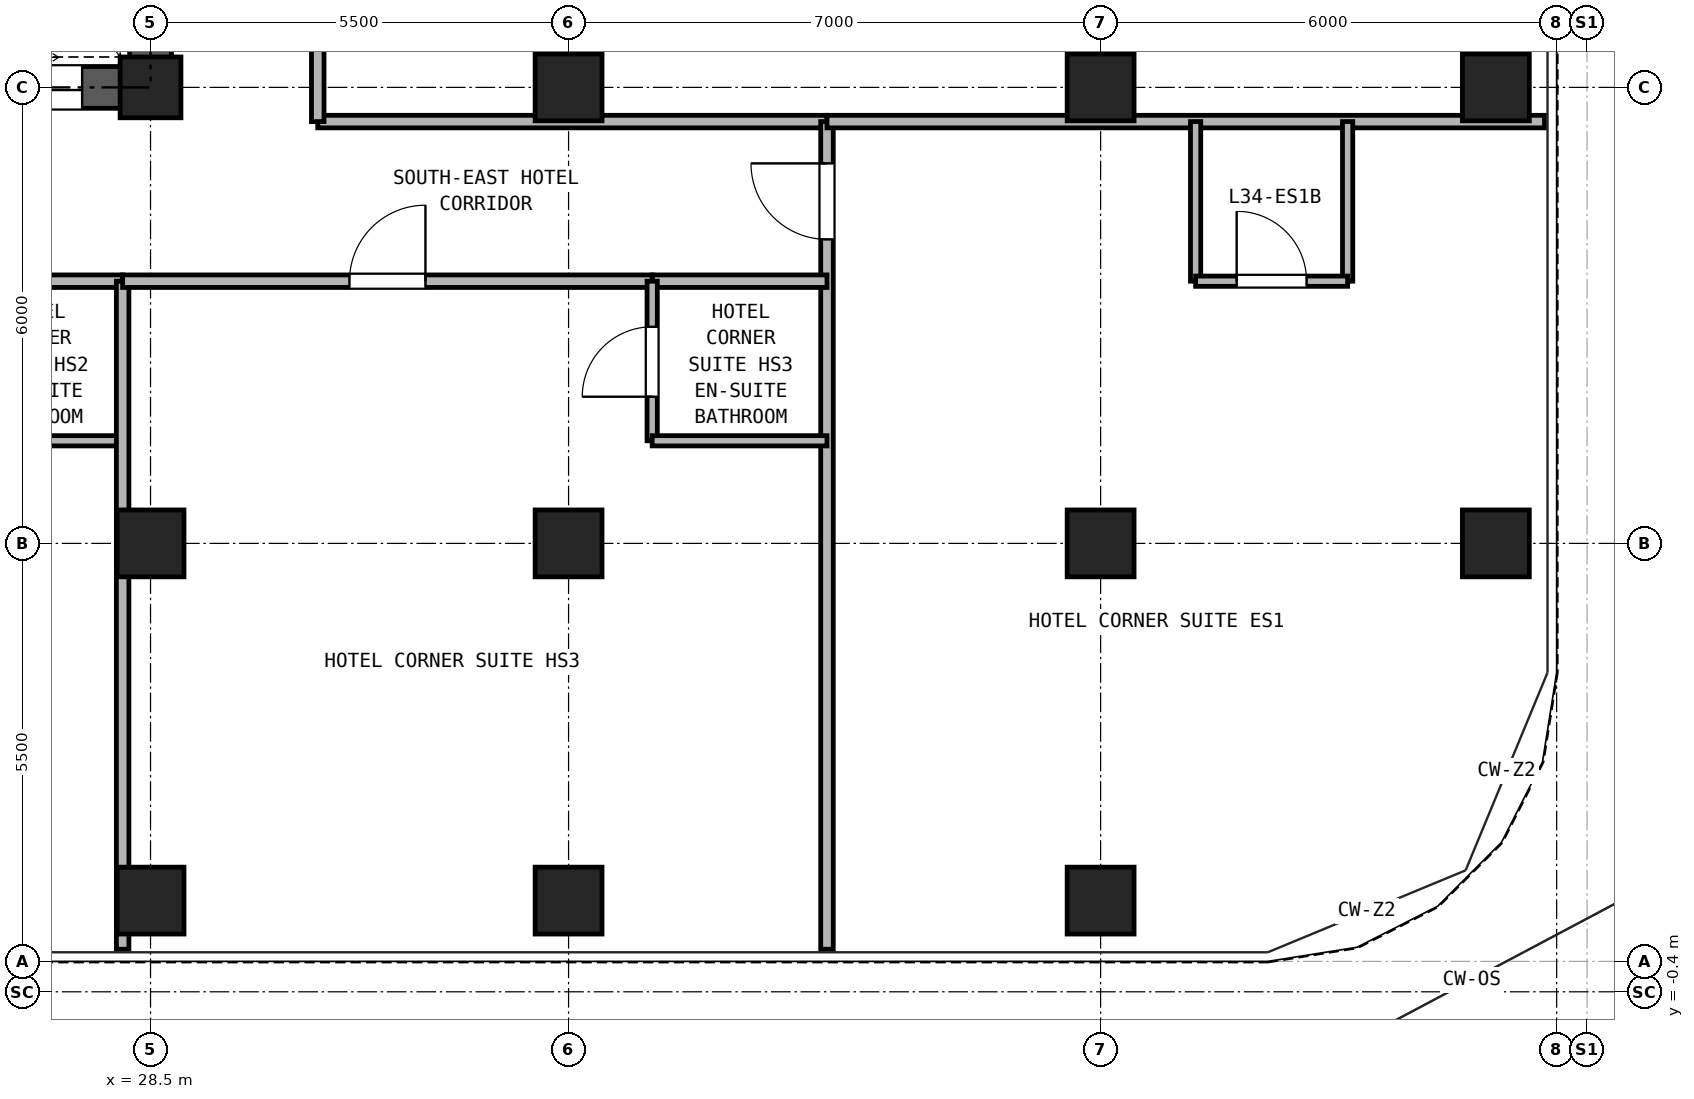
"""IFC4 building model, lengths in metres.
Left out: names, types, materials, properties, quantities, classifications, styles, units other than length and angle.
Written with IfcOpenShell. Run it as: python <this file> out.ifc"""

import sys

from ifc_helpers import new_model, si_unit, direction, frame, frame_2d, origin, origin_2d, place, context, subcontext, project, spatial, rectangle, hollow_rectangle, extrude, source, transform, mapped, element, fill, save


model = new_model("IFC4")
c1 = context("Model", 3, precision=1e-05, world=origin(), true_north=direction((0.0, 1.0)))
c2 = subcontext(c1, "Body", "Model", "MODEL_VIEW")
j1 = project(units=[si_unit("LENGTHUNIT", "METRE"), si_unit("PLANEANGLEUNIT", "RADIAN")], contexts=[c1])
p1 = place(None, origin())
s1 = spatial("IfcSite", under=j1, at=p1, CompositionType="ELEMENT")
p2 = place(p1, origin())
s2 = spatial("IfcBuilding", under=s1, at=p2, CompositionType="ELEMENT")
p3 = place(p2, frame((0.0, 0.0, 124.7)))
s3 = spatial("IfcBuildingStorey", under=s2, at=p3, CompositionType="ELEMENT", Elevation=124.7)
m1 = source(origin(), c2, "Body", "SweptSolid", [
    extrude(hollow_rectangle(XDim=0.88, YDim=0.88, WallThickness=0.05, at=origin_2d()), origin(), (0.0, 0.0, 1.0), 2.95),
])
for number, where, z_axis, x_axis in (
    (1, (28.5, 0.8, 0.0), (0.0, 0.0, 1.0), (1.0, 0.0, 0.0)),
    (2, (34.0, 0.8, 0.0), (0.0, 0.0, 1.0), (1.0, 0.0, 0.0)),
    (3, (41.0, 0.8, 0.0), (0.0, 0.0, 1.0), (1.0, 0.0, 0.0)),
    (4, (46.2, 5.5, 0.0), (0.0, 0.0, 1.0), (1.0, 0.0, 0.0)),
    (5, (46.2, 11.5, 0.0), (0.0, 0.0, 1.0), (1.0, 0.0, 0.0)),
    (6, (28.5, 5.5, 0.0), (0.0, 0.0, 1.0), (1.0, 0.0, 0.0)),
):
    element("IfcColumn", number, at=place(p3, frame(where, z_axis=z_axis, x_axis=x_axis)), inside=s3, PredefinedType="COLUMN", context=c2, shape_type="MappedRepresentation", body=[
        mapped(m1, transform((0.0, 0.0, 0.0), x_axis=(1.0, 0.0, 0.0), y_axis=(0.0, 1.0, 0.0), z_axis=(0.0, 0.0, 1.0), scale=1.0)),
    ])
m2 = source(origin(), c2, "Body", "SweptSolid", [
    extrude(hollow_rectangle(XDim=0.8, YDim=0.8, WallThickness=0.045, at=origin_2d()), origin(), (0.0, 0.0, 1.0), 2.95),
])
p4 = place(p3, frame((28.5, 11.5, 0.0), z_axis=(0.0, 0.0, 1.0), x_axis=(1.0, 0.0, 0.0)))
e7 = element("IfcColumn", 7, at=p4, inside=s3, PredefinedType="COLUMN", context=c2, shape_type="MappedRepresentation", body=[
    mapped(m2, transform((0.0, 0.0, 0.0), x_axis=(1.0, 0.0, 0.0), y_axis=(0.0, 1.0, 0.0), z_axis=(0.0, 0.0, 1.0), scale=1.0)),
])
for number, where, z_axis, x_axis in (
    (8, (34.0, 5.5, 0.0), (0.0, 0.0, 1.0), (1.0, 0.0, 0.0)),
    (9, (34.0, 11.5, 0.0), (0.0, 0.0, 1.0), (1.0, 0.0, 0.0)),
    (10, (41.0, 5.5, 0.0), (0.0, 0.0, 1.0), (1.0, 0.0, 0.0)),
    (11, (41.0, 11.5, 0.0), (0.0, 0.0, 1.0), (1.0, 0.0, 0.0)),
):
    element("IfcColumn", number, at=place(p3, frame(where, z_axis=z_axis, x_axis=x_axis)), inside=s3, PredefinedType="COLUMN", context=c2, shape_type="MappedRepresentation", body=[
        mapped(m1, transform((0.0, 0.0, 0.0), x_axis=(1.0, 0.0, 0.0), y_axis=(0.0, 1.0, 0.0), z_axis=(0.0, 0.0, 1.0), scale=1.0)),
    ])
p5 = place(p3, frame((18.225, 11.5, 0.0), z_axis=(0.0, 0.0, 1.0), x_axis=(1.0, 0.0, 0.0)))
e12 = element("IfcWall", 12, at=p5, inside=s3, PredefinedType="SHEAR", context=c2, shape_type="SweptSolid", body=[
    extrude(rectangle(XDim=10.55, YDim=0.55, at=frame_2d((5.275, 0.0))), origin(), (0.0, 0.0, 1.0), 2.95),
])
p6 = place(p5, frame((2.375, 0.0, 0.0)))
e13 = element("IfcOpeningElement", 13, at=p6, cuts=e12, PredefinedType="OPENING", context=c2, shape_type="SweptSolid", body=[
    extrude(rectangle(XDim=0.95, YDim=2.15, at=frame_2d((0.475, 1.075))), frame((0.0, 0.285, 0.0), z_axis=(0.0, -1.0, 0.0), x_axis=(1.0, 0.0, 0.0)), (0.0, 0.0, 1.0), 0.57),
])
p7 = place(p5, frame((5.875, 0.0, 0.0)))
e14 = element("IfcOpeningElement", 14, at=p7, cuts=e12, PredefinedType="OPENING", context=c2, shape_type="SweptSolid", body=[
    extrude(rectangle(XDim=1.1, YDim=2.25, at=frame_2d((0.55, 1.125))), frame((0.0, 0.285, 0.0), z_axis=(0.0, -1.0, 0.0), x_axis=(1.0, 0.0, 0.0)), (0.0, 0.0, 1.0), 0.57),
])
p8 = place(p5, frame((8.275, 0.0, 0.0)))
e15 = element("IfcOpeningElement", 15, at=p8, cuts=e12, PredefinedType="OPENING", context=c2, shape_type="SweptSolid", body=[
    extrude(rectangle(XDim=1.1, YDim=2.25, at=frame_2d((0.55, 1.125))), frame((0.0, 0.285, 0.0), z_axis=(0.0, -1.0, 0.0), x_axis=(1.0, 0.0, 0.0)), (0.0, 0.0, 1.0), 0.57),
])
p9 = place(p3, frame((28.5, 11.775, 0.0), z_axis=(0.0, 0.0, 1.0), x_axis=(0.0, 1.0, 0.0)))
e16 = element("IfcWall", 16, at=p9, inside=s3, PredefinedType="SHEAR", context=c2, shape_type="SweptSolid", body=[
    extrude(rectangle(XDim=16.7, YDim=0.55, at=frame_2d((8.35, 0.0))), origin(), (0.0, 0.0, 1.0), 2.95),
])
p10 = place(p9, frame((7.375, 0.0, 0.0)))
e17 = element("IfcOpeningElement", 17, at=p10, cuts=e16, PredefinedType="OPENING", context=c2, shape_type="SweptSolid", body=[
    extrude(rectangle(XDim=1.15, YDim=2.2, at=frame_2d((0.575, 1.1))), frame((0.0, 0.285, 0.0), z_axis=(0.0, -1.0, 0.0), x_axis=(1.0, 0.0, 0.0)), (0.0, 0.0, 1.0), 0.57),
])
p11 = place(p3, frame((30.7, 11.05, 0.0), z_axis=(0.0, 0.0, 1.0), x_axis=(1.0, 0.0, 0.0)))
e18 = element("IfcWall", 18, at=p11, inside=s3, PredefinedType="PARTITIONING", context=c2, shape_type="SweptSolid", body=[
    extrude(rectangle(XDim=6.7, YDim=0.165, at=frame_2d((3.35, 0.0))), origin(), (0.0, 0.0, 1.0), 2.95),
])
p12 = place(p3, frame((30.7, 11.05, 0.0), z_axis=(0.0, 0.0, 1.0), x_axis=(0.0, 1.0, 0.0)))
e19 = element("IfcWall", 19, at=p12, inside=s3, PredefinedType="PARTITIONING", context=c2, shape_type="SweptSolid", body=[
    extrude(rectangle(XDim=18.35, YDim=0.165, at=frame_2d((9.175, 0.0))), origin(), (0.0, 0.0, 1.0), 2.95),
])
p13 = place(p12, frame((8.675, 0.0, 0.0)))
e20 = element("IfcOpeningElement", 20, at=p13, cuts=e19, PredefinedType="OPENING", context=c2, shape_type="SweptSolid", body=[
    extrude(rectangle(XDim=0.95, YDim=2.15, at=frame_2d((0.475, 1.075))), frame((0.0, 0.093, 0.0), z_axis=(0.0, -1.0, 0.0), x_axis=(1.0, 0.0, 0.0)), (0.0, 0.0, 1.0), 0.185),
])
p14 = place(p3, frame((37.4, 0.16, 0.0), z_axis=(0.0, 0.0, 1.0), x_axis=(0.0, 1.0, 0.0)))
e21 = element("IfcWall", 21, at=p14, inside=s3, PredefinedType="PARTITIONING", context=c2, shape_type="SweptSolid", body=[
    extrude(rectangle(XDim=10.89, YDim=0.165, at=frame_2d((5.445, 0.0))), origin(), (0.0, 0.0, 1.0), 2.95),
])
p15 = place(p14, frame((9.34, 0.0, 0.0)))
e22 = element("IfcOpeningElement", 22, at=p15, cuts=e21, PredefinedType="OPENING", context=c2, shape_type="SweptSolid", body=[
    extrude(rectangle(XDim=1.0, YDim=2.15, at=frame_2d((0.5, 1.075))), frame((0.0, 0.093, 0.0), z_axis=(0.0, -1.0, 0.0), x_axis=(1.0, 0.0, 0.0)), (0.0, 0.0, 1.0), 0.185),
])
p16 = place(p3, frame((37.4, 11.05, 0.0), z_axis=(0.0, 0.0, 1.0), x_axis=(1.0, 0.0, 0.0)))
e23 = element("IfcWall", 23, at=p16, inside=s3, PredefinedType="PARTITIONING", context=c2, shape_type="SweptSolid", body=[
    extrude(rectangle(XDim=9.44, YDim=0.165, at=frame_2d((4.72, 0.0))), origin(), (0.0, 0.0, 1.0), 2.95),
])
for number, where, z_axis, x_axis in (
    (24, (42.25, 8.95, 0.0), (0.0, 0.0, 1.0), (0.0, 1.0, 0.0)),
    (25, (44.25, 8.95, 0.0), (0.0, 0.0, 1.0), (0.0, 1.0, 0.0)),
):
    element("IfcWall", number, at=place(p3, frame(where, z_axis=z_axis, x_axis=x_axis)), inside=s3, PredefinedType="PARTITIONING", context=c2, shape_type="SweptSolid", body=[
        extrude(rectangle(XDim=2.1, YDim=0.135, at=frame_2d((1.05, 0.0))), origin(), (0.0, 0.0, 1.0), 2.95),
    ])
p17 = place(p3, frame((42.25, 8.95, 0.0), z_axis=(0.0, 0.0, 1.0), x_axis=(1.0, 0.0, 0.0)))
e26 = element("IfcWall", 26, at=p17, inside=s3, PredefinedType="PARTITIONING", context=c2, shape_type="SweptSolid", body=[
    extrude(rectangle(XDim=2.0, YDim=0.135, at=frame_2d((1.0, 0.0))), origin(), (0.0, 0.0, 1.0), 2.95),
])
p18 = place(p17, frame((0.54, 0.0, 0.0)))
e27 = element("IfcOpeningElement", 27, at=p18, cuts=e26, PredefinedType="OPENING", context=c2, shape_type="SweptSolid", body=[
    extrude(rectangle(XDim=0.92, YDim=2.1, at=frame_2d((0.46, 1.05))), frame((0.0, 0.077, 0.0), z_axis=(0.0, -1.0, 0.0), x_axis=(1.0, 0.0, 0.0)), (0.0, 0.0, 1.0), 0.155),
])
p19 = place(p3, frame((25.833, 8.95, 0.0), z_axis=(0.0, 0.0, 1.0), x_axis=(1.0, 0.0, 0.0)))
e28 = element("IfcWall", 28, at=p19, inside=s3, PredefinedType="PARTITIONING", context=c2, shape_type="SweptSolid", body=[
    extrude(rectangle(XDim=2.3, YDim=0.165, at=frame_2d((1.15, 0.0))), origin(), (0.0, 0.0, 1.0), 2.95),
])
p20 = place(p3, frame((25.833, 6.85, 0.0), z_axis=(0.0, 0.0, 1.0), x_axis=(1.0, 0.0, 0.0)))
e29 = element("IfcWall", 29, at=p20, inside=s3, PredefinedType="PARTITIONING", context=c2, shape_type="SweptSolid", body=[
    extrude(rectangle(XDim=2.3, YDim=0.135, at=frame_2d((1.15, 0.0))), origin(), (0.0, 0.0, 1.0), 2.95),
])
p21 = place(p3, frame((28.133, 0.16, 0.0), z_axis=(0.0, 0.0, 1.0), x_axis=(0.0, 1.0, 0.0)))
e30 = element("IfcWall", 30, at=p21, inside=s3, PredefinedType="PARTITIONING", context=c2, shape_type="SweptSolid", body=[
    extrude(rectangle(XDim=8.79, YDim=0.165, at=frame_2d((4.395, 0.0))), origin(), (0.0, 0.0, 1.0), 2.95),
])
p22 = place(p3, frame((35.1, 8.95, 0.0), z_axis=(0.0, 0.0, 1.0), x_axis=(1.0, 0.0, 0.0)))
e31 = element("IfcWall", 31, at=p22, inside=s3, PredefinedType="PARTITIONING", context=c2, shape_type="SweptSolid", body=[
    extrude(rectangle(XDim=2.3, YDim=0.165, at=frame_2d((1.15, 0.0))), origin(), (0.0, 0.0, 1.0), 2.95),
])
p23 = place(p3, frame((28.133, 8.95, 0.0), z_axis=(0.0, 0.0, 1.0), x_axis=(1.0, 0.0, 0.0)))
e32 = element("IfcWall", 32, at=p23, inside=s3, PredefinedType="PARTITIONING", context=c2, shape_type="SweptSolid", body=[
    extrude(rectangle(XDim=6.967, YDim=0.165, at=frame_2d((3.483, 0.0))), origin(), (0.0, 0.0, 1.0), 2.95),
])
p24 = place(p23, frame((2.984, 0.0, 0.0)))
e33 = element("IfcOpeningElement", 33, at=p24, cuts=e32, PredefinedType="OPENING", context=c2, shape_type="SweptSolid", body=[
    extrude(rectangle(XDim=1.0, YDim=2.15, at=frame_2d((0.5, 1.075))), frame((0.0, 0.093, 0.0), z_axis=(0.0, -1.0, 0.0), x_axis=(1.0, 0.0, 0.0)), (0.0, 0.0, 1.0), 0.185),
])
p25 = place(p3, frame((35.1, 6.85, 0.0), z_axis=(0.0, 0.0, 1.0), x_axis=(0.0, 1.0, 0.0)))
e34 = element("IfcWall", 34, at=p25, inside=s3, PredefinedType="PARTITIONING", context=c2, shape_type="SweptSolid", body=[
    extrude(rectangle(XDim=2.1, YDim=0.135, at=frame_2d((1.05, 0.0))), origin(), (0.0, 0.0, 1.0), 2.95),
])
p26 = place(p25, frame((0.58, 0.0, 0.0)))
e35 = element("IfcOpeningElement", 35, at=p26, cuts=e34, PredefinedType="OPENING", context=c2, shape_type="SweptSolid", body=[
    extrude(rectangle(XDim=0.92, YDim=2.1, at=frame_2d((0.46, 1.05))), frame((0.0, 0.077, 0.0), z_axis=(0.0, -1.0, 0.0), x_axis=(1.0, 0.0, 0.0)), (0.0, 0.0, 1.0), 0.155),
])
p27 = place(p3, frame((35.1, 6.85, 0.0), z_axis=(0.0, 0.0, 1.0), x_axis=(1.0, 0.0, 0.0)))
e36 = element("IfcWall", 36, at=p27, inside=s3, PredefinedType="PARTITIONING", context=c2, shape_type="SweptSolid", body=[
    extrude(rectangle(XDim=2.3, YDim=0.135, at=frame_2d((1.15, 0.0))), origin(), (0.0, 0.0, 1.0), 2.95),
])
p28 = place(p8, frame((1.1, 0.0, 0.0), z_axis=(0.0, 0.0, 1.0), x_axis=(-1.0, 0.0, 0.0)))
e37 = element("IfcDoor", 37, at=p28, inside=s3, OperationType="DOUBLE_DOOR_SLIDING", PredefinedType="DOOR", context=c2, shape_type="SweptSolid", body=[
    extrude(rectangle(XDim=1.1, YDim=2.25, at=frame_2d((0.55, 1.125))), frame((0.0, 0.025, 0.0), z_axis=(0.0, -1.0, 0.0), x_axis=(1.0, 0.0, 0.0)), (0.0, 0.0, 1.0), 0.05),
])
fill(e15, e37)
p29 = place(p18, origin())
e38 = element("IfcDoor", 38, at=p29, inside=s3, OperationType="SINGLE_SWING_LEFT", PredefinedType="DOOR", context=c2, shape_type="SweptSolid", body=[
    extrude(rectangle(XDim=0.92, YDim=2.1, at=frame_2d((0.46, 1.05))), frame((0.0, 0.025, 0.0), z_axis=(0.0, -1.0, 0.0), x_axis=(1.0, 0.0, 0.0)), (0.0, 0.0, 1.0), 0.05),
])
fill(e27, e38)
p30 = place(p15, frame((1.0, 0.0, 0.0), z_axis=(0.0, 0.0, 1.0), x_axis=(-1.0, 0.0, 0.0)))
e39 = element("IfcDoor", 39, at=p30, inside=s3, OperationType="SINGLE_SWING_RIGHT", PredefinedType="DOOR", context=c2, shape_type="SweptSolid", body=[
    extrude(rectangle(XDim=1.0, YDim=2.15, at=frame_2d((0.5, 1.075))), frame((0.0, 0.025, 0.0), z_axis=(0.0, -1.0, 0.0), x_axis=(1.0, 0.0, 0.0)), (0.0, 0.0, 1.0), 0.05),
])
fill(e22, e39)
p31 = place(p26, origin())
e40 = element("IfcDoor", 40, at=p31, inside=s3, OperationType="SINGLE_SWING_LEFT", PredefinedType="DOOR", context=c2, shape_type="SweptSolid", body=[
    extrude(rectangle(XDim=0.92, YDim=2.1, at=frame_2d((0.46, 1.05))), frame((0.0, 0.025, 0.0), z_axis=(0.0, -1.0, 0.0), x_axis=(1.0, 0.0, 0.0)), (0.0, 0.0, 1.0), 0.05),
])
fill(e35, e40)
p32 = place(p24, frame((1.0, 0.0, 0.0), z_axis=(0.0, 0.0, 1.0), x_axis=(-1.0, 0.0, 0.0)))
e41 = element("IfcDoor", 41, at=p32, inside=s3, OperationType="SINGLE_SWING_RIGHT", PredefinedType="DOOR", context=c2, shape_type="SweptSolid", body=[
    extrude(rectangle(XDim=1.0, YDim=2.15, at=frame_2d((0.5, 1.075))), frame((0.0, 0.025, 0.0), z_axis=(0.0, -1.0, 0.0), x_axis=(1.0, 0.0, 0.0)), (0.0, 0.0, 1.0), 0.05),
])
fill(e33, e41)
save(model, sys.argv[1])
